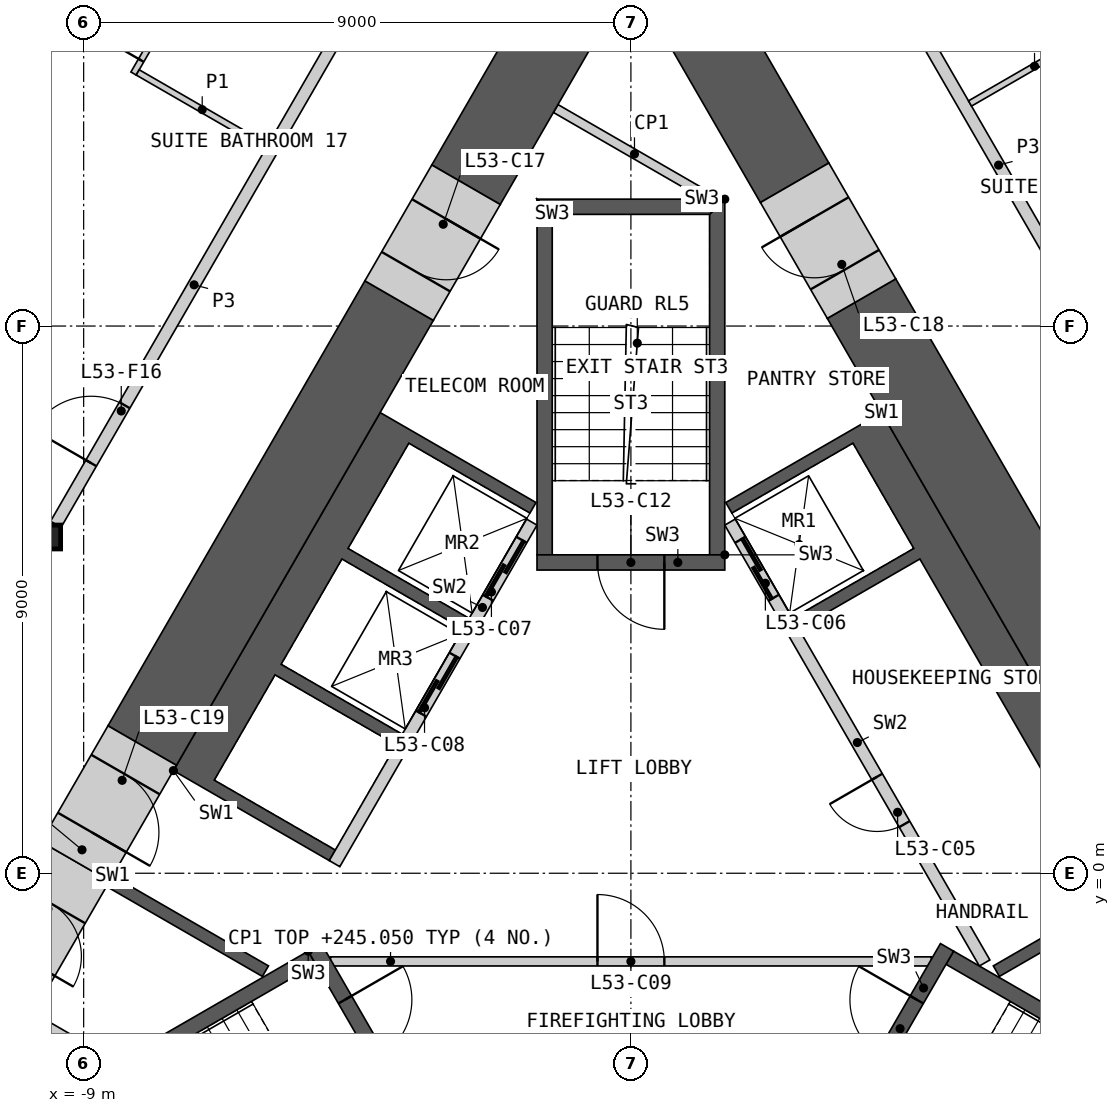
"""IFC4 building model, lengths in metres.
Left out: names, types, materials, properties, quantities, classifications, styles, units other than length and angle.
Written with IfcOpenShell. Run it as: python <this file> out.ifc"""

import sys

from ifc_helpers import new_model, si_unit, direction, frame, frame_2d, origin, origin_2d, place, context, subcontext, project, spatial, polyline, rectangle, i_section, outline, extrude, element, fill, save


model = new_model("IFC4")
c1 = context("Model", 3, precision=1e-05, world=origin(), true_north=direction((0.0, 1.0)))
c2 = subcontext(c1, "Body", "Model", "MODEL_VIEW")
j1 = project(units=[si_unit("LENGTHUNIT", "METRE"), si_unit("PLANEANGLEUNIT", "RADIAN")], contexts=[c1])
p1 = place(None, origin())
s1 = spatial("IfcSite", under=j1, at=p1, CompositionType="ELEMENT")
p2 = place(p1, origin())
s2 = spatial("IfcBuilding", under=s1, at=p2, CompositionType="ELEMENT")
p3 = place(p2, frame((0.0, 0.0, 241.8)))
s3 = spatial("IfcBuildingStorey", under=s2, at=p3, CompositionType="ELEMENT", Elevation=241.8)
p4 = place(p3, frame((-9.578, 5.53, 0.0), z_axis=(0.0, 0.0, 1.0), x_axis=(1.0, 0.0, 0.0)))
e1 = element("IfcColumn", 1, at=p4, inside=s3, PredefinedType="COLUMN", context=c2, shape_type="SweptSolid", body=[
    extrude(i_section(OverallWidth=0.399, OverallDepth=0.393, WebThickness=0.023, FlangeThickness=0.037, at=origin_2d()), origin(), (0.0, 0.0, 1.0), 3.6),
])
p5 = place(p3, origin())
e2 = element("IfcWall", 2, at=p5, inside=s3, PredefinedType="SHEAR", context=c2, shape_type="SweptSolid", body=[
    extrude(outline(polyline([(4.124, 7.577), (8.624, -0.217), (8.231, -0.444), (6.061, -1.697), (5.96, -1.524), (7.952, -0.374), (4.752, 5.169), (2.76, 4.019), (2.66, 4.192), (4.652, 5.342), (3.652, 7.074), (1.66, 5.924), (1.561, 6.097), (3.731, 7.35), (4.124, 7.577)])), origin(), (0.0, 0.0, 1.0), 3.25),
])
p6 = place(p3, frame((5.817, -1.476, 0.0), z_axis=(0.0, 0.0, 1.0), x_axis=(-0.500002616675, 0.866023893041, 0.0)))
e3 = element("IfcWall", 3, at=p6, inside=s3, PredefinedType="SOLIDWALL", context=c2, shape_type="SweptSolid", body=[
    extrude(rectangle(XDim=8.373, YDim=0.2, at=frame_2d((4.187, 0.0))), origin(), (0.0, 0.0, 1.0), 3.25),
])
p7 = place(p6, frame((2.637, 0.0, 0.0)))
e4 = element("IfcOpeningElement", 4, at=p7, cuts=e3, PredefinedType="OPENING", context=c2, shape_type="SweptSolid", body=[
    extrude(rectangle(XDim=0.9, YDim=2.1, at=frame_2d((0.45, 1.05))), frame((0.0, 0.11, 0.0), z_axis=(0.0, -1.0, 0.0), x_axis=(1.0, 0.0, 0.0)), (0.0, 0.0, 1.0), 0.22),
])
p8 = place(p6, frame((6.937, 0.0, 0.0)))
e5 = element("IfcOpeningElement", 5, at=p8, cuts=e3, PredefinedType="OPENING", context=c2, shape_type="SweptSolid", body=[
    extrude(rectangle(XDim=1.1, YDim=2.1, at=frame_2d((0.55, 1.05))), frame((0.0, 0.11, 0.0), z_axis=(0.0, -1.0, 0.0), x_axis=(1.0, 0.0, 0.0)), (0.0, 0.0, 1.0), 0.22),
])
p9 = place(p3, origin())
e6 = element("IfcWall", 6, at=p9, inside=s3, PredefinedType="SHEAR", context=c2, shape_type="SweptSolid", body=[
    extrude(outline(polyline([(-7.524, 1.688), (-4.124, 7.577), (-3.731, 7.35), (-1.561, 6.097), (-1.66, 5.924), (-3.652, 7.074), (-4.652, 5.342), (-2.66, 4.192), (-2.76, 4.019), (-4.752, 5.169), (-5.752, 3.437), (-3.76, 2.287), (-3.861, 2.113), (-5.852, 3.263), (-6.852, 1.531), (-4.861, 0.381), (-4.96, 0.208), (-7.131, 1.461), (-7.524, 1.688)])), origin(), (0.0, 0.0, 1.0), 3.25),
])
p10 = place(p3, origin())
e7 = element("IfcWall", 7, at=p10, inside=s3, PredefinedType="SHEAR", context=c2, shape_type="SweptSolid", body=[
    extrude(outline(polyline([(-8.524, -0.044), (-8.131, -0.271), (-5.96, -1.524), (-6.061, -1.697), (-8.231, -0.444), (-8.624, -0.217), (-8.524, -0.044)])), origin(), (0.0, 0.0, 1.0), 3.25),
])
p11 = place(p3, frame((-1.631, 5.776, 0.0), z_axis=(0.0, 0.0, 1.0), x_axis=(-0.499992876559, -0.866029516466, 0.0)))
e8 = element("IfcWall", 8, at=p11, inside=s3, PredefinedType="SOLIDWALL", context=c2, shape_type="SweptSolid", body=[
    extrude(rectangle(XDim=6.486, YDim=0.2, at=frame_2d((3.243, 0.0))), origin(), (0.0, 0.0, 1.0), 3.25),
])
p12 = place(p11, frame((0.337, 0.0, 0.0)))
e9 = element("IfcOpeningElement", 9, at=p12, cuts=e8, PredefinedType="OPENING", context=c2, shape_type="SweptSolid", body=[
    extrude(rectangle(XDim=1.1, YDim=2.1, at=frame_2d((0.55, 1.05))), frame((0.0, 0.11, 0.0), z_axis=(0.0, -1.0, 0.0), x_axis=(1.0, 0.0, 0.0)), (0.0, 0.0, 1.0), 0.22),
])
p13 = place(p11, frame((2.537, 0.0, 0.0)))
e10 = element("IfcOpeningElement", 10, at=p13, cuts=e8, PredefinedType="OPENING", context=c2, shape_type="SweptSolid", body=[
    extrude(rectangle(XDim=1.1, YDim=2.1, at=frame_2d((0.55, 1.05))), frame((0.0, 0.11, 0.0), z_axis=(0.0, -1.0, 0.0), x_axis=(1.0, 0.0, 0.0)), (0.0, 0.0, 1.0), 0.22),
])
p14 = place(p3, frame((-4.941, -1.45, 0.0), z_axis=(0.0, 0.0, 1.0), x_axis=(1.0, 0.0, 0.0)))
e11 = element("IfcWall", 11, at=p14, inside=s3, PredefinedType="PARTITIONING", context=c2, shape_type="SweptSolid", body=[
    extrude(rectangle(XDim=9.882, YDim=0.15, at=frame_2d((4.941, 0.0))), origin(), (0.0, 0.0, 1.0), 3.25),
])
p15 = place(p14, frame((4.391, 0.0, 0.0)))
e12 = element("IfcOpeningElement", 12, at=p15, cuts=e11, PredefinedType="OPENING", context=c2, shape_type="SweptSolid", body=[
    extrude(rectangle(XDim=1.1, YDim=2.1, at=frame_2d((0.55, 1.05))), frame((0.0, 0.085, 0.0), z_axis=(0.0, -1.0, 0.0), x_axis=(1.0, 0.0, 0.0)), (0.0, 0.0, 1.0), 0.17),
])
p16 = place(p3, origin())
e13 = element("IfcWall", 13, at=p16, inside=s3, PredefinedType="SHEAR", context=c2, shape_type="SweptSolid", body=[
    extrude(outline(polyline([(-5.307, -1.281), (-10.374, -4.206), (-10.032, -4.298), (-5.182, -1.498), (-5.307, -1.281)])), origin(), (0.0, 0.0, 1.0), 3.25),
])
p17 = place(p3, frame((-5.199, -1.219, 0.0), z_axis=(0.0, 0.0, 1.0), x_axis=(0.499982516597, -0.866035497597, 0.0)))
e14 = element("IfcWall", 14, at=p17, inside=s3, PredefinedType="SHEAR", context=c2, shape_type="SweptSolid", body=[
    extrude(rectangle(XDim=3.088, YDim=0.25, at=frame_2d((1.544, 0.0))), origin(), (0.0, 0.0, 1.0), 3.25),
])
p18 = place(p17, frame((0.994, 0.0, 0.0)))
e15 = element("IfcOpeningElement", 15, at=p18, cuts=e14, PredefinedType="OPENING", context=c2, shape_type="SweptSolid", body=[
    extrude(rectangle(XDim=1.1, YDim=2.1, at=frame_2d((0.55, 1.05))), frame((0.0, 0.135, 0.0), z_axis=(0.0, -1.0, 0.0), x_axis=(1.0, 0.0, 0.0)), (0.0, 0.0, 1.0), 0.27),
])
p19 = place(p3, origin())
e16 = element("IfcWall", 16, at=p19, inside=s3, PredefinedType="SHEAR", context=c2, shape_type="SweptSolid", body=[
    extrude(outline(polyline([(10.032, -4.298), (10.374, -4.206), (5.307, -1.281), (5.182, -1.498), (10.032, -4.298)])), origin(), (0.0, 0.0, 1.0), 3.25),
])
p20 = place(p3, frame((3.655, -3.893, 0.0), z_axis=(0.0, 0.0, 1.0), x_axis=(0.499982516597, 0.866035497597, 0.0)))
e17 = element("IfcWall", 17, at=p20, inside=s3, PredefinedType="SHEAR", context=c2, shape_type="SweptSolid", body=[
    extrude(rectangle(XDim=3.088, YDim=0.25, at=frame_2d((1.544, 0.0))), origin(), (0.0, 0.0, 1.0), 3.25),
])
p21 = place(p20, frame((0.994, 0.0, 0.0)))
e18 = element("IfcOpeningElement", 18, at=p21, cuts=e17, PredefinedType="OPENING", context=c2, shape_type="SweptSolid", body=[
    extrude(rectangle(XDim=1.1, YDim=2.1, at=frame_2d((0.55, 1.05))), frame((0.0, 0.135, 0.0), z_axis=(0.0, -1.0, 0.0), x_axis=(1.0, 0.0, 0.0)), (0.0, 0.0, 1.0), 0.27),
])
p22 = place(p3, origin())
e19 = element("IfcWall", 19, at=p22, inside=s3, PredefinedType="SHEAR", context=c2, shape_type="SweptSolid", body=[
    extrude(outline(polyline([(1.544, 5.237), (1.544, 11.087), (1.294, 10.837), (1.294, 5.237), (1.544, 5.237)])), origin(), (0.0, 0.0, 1.0), 3.25),
])
p23 = place(p3, origin())
e20 = element("IfcWall", 20, at=p23, inside=s3, PredefinedType="SHEAR", context=c2, shape_type="SweptSolid", body=[
    extrude(outline(polyline([(1.544, 11.087), (-1.544, 11.087), (-1.294, 10.837), (1.294, 10.837), (1.544, 11.087)])), origin(), (0.0, 0.0, 1.0), 3.25),
])
p24 = place(p3, origin())
e21 = element("IfcWall", 21, at=p24, inside=s3, PredefinedType="SHEAR", context=c2, shape_type="SweptSolid", body=[
    extrude(outline(polyline([(-1.294, 10.837), (-1.544, 11.087), (-1.544, 5.237), (-1.294, 5.237), (-1.294, 10.837)])), origin(), (0.0, 0.0, 1.0), 3.25),
])
p25 = place(p3, frame((1.544, 5.112, 0.0), z_axis=(0.0, 0.0, 1.0), x_axis=(-1.0, 0.0, 0.0)))
e22 = element("IfcWall", 22, at=p25, inside=s3, PredefinedType="SHEAR", context=c2, shape_type="SweptSolid", body=[
    extrude(rectangle(XDim=3.088, YDim=0.25, at=frame_2d((1.544, 0.0))), origin(), (0.0, 0.0, 1.0), 3.25),
])
p26 = place(p25, frame((0.994, 0.0, 0.0)))
e23 = element("IfcOpeningElement", 23, at=p26, cuts=e22, PredefinedType="OPENING", context=c2, shape_type="SweptSolid", body=[
    extrude(rectangle(XDim=1.1, YDim=2.1, at=frame_2d((0.55, 1.05))), frame((0.0, 0.135, 0.0), z_axis=(0.0, -1.0, 0.0), x_axis=(1.0, 0.0, 0.0)), (0.0, 0.0, 1.0), 0.27),
])
p27 = place(p3, frame((-1.237, 12.578, 0.0), z_axis=(0.0, 0.0, 1.0), x_axis=(0.866045649925, -0.499964931016, 0.0)))
e24 = element("IfcWall", 24, at=p27, inside=s3, PredefinedType="PARTITIONING", context=c2, shape_type="SweptSolid", body=[
    extrude(rectangle(XDim=2.992, YDim=0.15, at=frame_2d((1.496, 0.0))), origin(), (0.0, 0.0, 1.0), 3.25),
])
p28 = place(p3, frame((-9.862, -2.361, 0.0), z_axis=(0.0, 0.0, 1.0), x_axis=(0.865990094875, -0.500061151839, 0.0)))
e25 = element("IfcWall", 25, at=p28, inside=s3, PredefinedType="PARTITIONING", context=c2, shape_type="SweptSolid", body=[
    extrude(rectangle(XDim=1.56, YDim=0.15, at=frame_2d((0.78, 0.0))), origin(), (0.0, 0.0, 1.0), 3.25),
])
p29 = place(p3, frame((10.062, -1.408, 0.0), z_axis=(0.0, 0.0, 1.0), x_axis=(-0.500000545805, 0.866025088663, 0.0)))
e26 = element("IfcWall", 26, at=p29, inside=s3, PredefinedType="SHEAR", context=c2, shape_type="SweptSolid", body=[
    extrude(rectangle(XDim=12.539, YDim=1.3, at=frame_2d((6.27, 0.0))), origin(), (0.0, 0.0, 1.0), 3.25),
])
p30 = place(p3, frame((2.693, 11.356, 0.0), z_axis=(0.0, 0.0, 1.0), x_axis=(-0.50002837164, 0.866009022791, 0.0)))
e27 = element("IfcWall", 27, at=p30, inside=s3, PredefinedType="SHEAR", context=c2, shape_type="SweptSolid", body=[
    extrude(rectangle(XDim=4.26, YDim=1.3, at=frame_2d((2.13, 0.0))), origin(), (0.0, 0.0, 1.0), 3.25),
])
p31 = place(p3, frame((-3.812, 9.418, 0.0), z_axis=(0.0, 0.0, 1.0), x_axis=(-0.499995037753, -0.86602826872, 0.0)))
e28 = element("IfcWall", 28, at=p31, inside=s3, PredefinedType="SHEAR", context=c2, shape_type="SweptSolid", body=[
    extrude(rectangle(XDim=8.451, YDim=1.3, at=frame_2d((4.225, 0.0))), origin(), (0.0, 0.0, 1.0), 3.25),
])
p32 = place(p3, frame((-0.563, 15.045, 0.0), z_axis=(0.0, 0.0, 1.0), x_axis=(-0.499994567278, -0.866028540345, 0.0)))
e29 = element("IfcWall", 29, at=p32, inside=s3, PredefinedType="SHEAR", context=c2, shape_type="SweptSolid", body=[
    extrude(rectangle(XDim=4.297, YDim=1.3, at=frame_2d((2.149, 0.0))), origin(), (0.0, 0.0, 1.0), 3.25),
])
p33 = place(p3, frame((-9.137, 0.195, 0.0), z_axis=(0.0, 0.0, 1.0), x_axis=(-0.500009943768, -0.866019662671, 0.0)))
e30 = element("IfcWall", 30, at=p33, inside=s3, PredefinedType="SHEAR", context=c2, shape_type="SweptSolid", body=[
    extrude(rectangle(XDim=2.401, YDim=1.3, at=frame_2d((1.201, 0.0))), origin(), (0.0, 0.0, 1.0), 3.25),
])
p34 = place(p33, frame((0.8, 0.0, 0.0)))
e31 = element("IfcOpeningElement", 31, at=p34, cuts=e30, PredefinedType="OPENING", context=c2, shape_type="SweptSolid", body=[
    extrude(rectangle(XDim=1.0, YDim=2.1, at=frame_2d((0.5, 1.05))), frame((0.0, 0.66, 0.0), z_axis=(0.0, -1.0, 0.0), x_axis=(1.0, 0.0, 0.0)), (0.0, 0.0, 1.0), 1.32),
])
p35 = place(p3, frame((-2.712, 11.324, 0.0), z_axis=(0.0, 0.0, 1.0), x_axis=(-0.499946605688, -0.86605622881, 0.0)))
e32 = element("IfcWall", 32, at=p35, inside=s3, PredefinedType="SHEAR", context=c2, shape_type="SweptSolid", body=[
    extrude(rectangle(XDim=2.2, YDim=1.3, at=frame_2d((1.1, 0.0))), origin(), (0.0, 0.0, 1.0), 3.25),
])
p36 = place(p35, frame((0.65, 0.0, 0.0)))
e33 = element("IfcOpeningElement", 33, at=p36, cuts=e32, PredefinedType="OPENING", context=c2, shape_type="SweptSolid", body=[
    extrude(rectangle(XDim=1.0, YDim=2.1, at=frame_2d((0.5, 1.05))), frame((0.0, 0.66, 0.0), z_axis=(0.0, -1.0, 0.0), x_axis=(1.0, 0.0, 0.0)), (0.0, 0.0, 1.0), 1.32),
])
p37 = place(p3, frame((3.793, 9.451, 0.0), z_axis=(0.0, 0.0, 1.0), x_axis=(-0.499946605688, 0.86605622881, 0.0)))
e34 = element("IfcWall", 34, at=p37, inside=s3, PredefinedType="SHEAR", context=c2, shape_type="SweptSolid", body=[
    extrude(rectangle(XDim=2.2, YDim=1.3, at=frame_2d((1.1, 0.0))), origin(), (0.0, 0.0, 1.0), 3.25),
])
p38 = place(p37, frame((0.55, 0.0, 0.0)))
e35 = element("IfcOpeningElement", 35, at=p38, cuts=e34, PredefinedType="OPENING", context=c2, shape_type="SweptSolid", body=[
    extrude(rectangle(XDim=1.0, YDim=2.1, at=frame_2d((0.5, 1.05))), frame((0.0, 0.66, 0.0), z_axis=(0.0, -1.0, 0.0), x_axis=(1.0, 0.0, 0.0)), (0.0, 0.0, 1.0), 1.32),
])
p39 = place(p3, frame((-8.037, 2.1, 0.0), z_axis=(0.0, 0.0, 1.0), x_axis=(-0.50002983664, -0.866008176907, 0.0)))
e36 = element("IfcWall", 36, at=p39, inside=s3, PredefinedType="SHEAR", context=c2, shape_type="SweptSolid", body=[
    extrude(rectangle(XDim=2.2, YDim=1.3, at=frame_2d((1.1, 0.0))), origin(), (0.0, 0.0, 1.0), 3.25),
])
p40 = place(p39, frame((0.55, 0.0, 0.0)))
e37 = element("IfcOpeningElement", 37, at=p40, cuts=e36, PredefinedType="OPENING", context=c2, shape_type="SweptSolid", body=[
    extrude(rectangle(XDim=1.1, YDim=2.1, at=frame_2d((0.55, 1.05))), frame((0.0, 0.66, 0.0), z_axis=(0.0, -1.0, 0.0), x_axis=(1.0, 0.0, 0.0)), (0.0, 0.0, 1.0), 1.32),
])
p41 = place(p3, frame((4.91, 13.616, 0.0), z_axis=(0.0, 0.0, 1.0), x_axis=(0.50000207303, -0.866024206917, 0.0)))
e38 = element("IfcWall", 38, at=p41, inside=s3, PredefinedType="PARTITIONING", context=c2, shape_type="SweptSolid", body=[
    extrude(rectangle(XDim=9.095, YDim=0.2, at=frame_2d((4.547, 0.0))), origin(), (0.0, 0.0, 1.0), 3.25),
])
p42 = place(p41, frame((5.726, 0.0, 0.0)))
e39 = element("IfcOpeningElement", 39, at=p42, cuts=e38, PredefinedType="OPENING", context=c2, shape_type="SweptSolid", body=[
    extrude(rectangle(XDim=1.8, YDim=2.1, at=frame_2d((0.9, 1.05))), frame((0.0, 0.11, 0.0), z_axis=(0.0, -1.0, 0.0), x_axis=(1.0, 0.0, 0.0)), (0.0, 0.0, 1.0), 0.22),
])
p43 = place(p3, frame((-9.458, 5.74, 0.0), z_axis=(0.0, 0.0, 1.0), x_axis=(0.50000207303, 0.866024206917, 0.0)))
e40 = element("IfcWall", 40, at=p43, inside=s3, PredefinedType="PARTITIONING", context=c2, shape_type="SweptSolid", body=[
    extrude(rectangle(XDim=9.095, YDim=0.2, at=frame_2d((4.547, 0.0))), origin(), (0.0, 0.0, 1.0), 3.25),
])
p44 = place(p43, frame((1.162, 0.0, 0.0)))
e41 = element("IfcOpeningElement", 41, at=p44, cuts=e40, PredefinedType="OPENING", context=c2, shape_type="SweptSolid", body=[
    extrude(rectangle(XDim=1.1, YDim=2.1, at=frame_2d((0.55, 1.05))), frame((0.0, 0.11, 0.0), z_axis=(0.0, -1.0, 0.0), x_axis=(1.0, 0.0, 0.0)), (0.0, 0.0, 1.0), 0.22),
])
p45 = place(p3, frame((-8.179, 13.153, 0.0), z_axis=(0.0, 0.0, 1.0), x_axis=(0.499996545922, 0.866027397988, 0.0)))
e42 = element("IfcWall", 42, at=p45, inside=s3, PredefinedType="PARTITIONING", context=c2, shape_type="SweptSolid", body=[
    extrude(rectangle(XDim=5.5, YDim=0.1, at=frame_2d((2.75, 0.0))), origin(), (0.0, 0.0, 1.0), 2.404),
])
p46 = place(p45, frame((4.3, 0.0, 0.0)))
e43 = element("IfcOpeningElement", 43, at=p46, cuts=e42, PredefinedType="OPENING", context=c2, shape_type="SweptSolid", body=[
    extrude(rectangle(XDim=0.95, YDim=2.1, at=frame_2d((0.475, 1.05))), frame((0.0, 0.06, 0.0), z_axis=(0.0, -1.0, 0.0), x_axis=(1.0, 0.0, 0.0)), (0.0, 0.0, 1.0), 0.12),
])
p47 = place(p45, frame((0.25, 0.0, 0.0)))
e44 = element("IfcOpeningElement", 44, at=p47, cuts=e42, PredefinedType="OPENING", context=c2, shape_type="SweptSolid", body=[
    extrude(rectangle(XDim=0.95, YDim=2.1, at=frame_2d((0.475, 1.05))), frame((0.0, 0.06, 0.0), z_axis=(0.0, -1.0, 0.0), x_axis=(1.0, 0.0, 0.0)), (0.0, 0.0, 1.0), 0.12),
])
p48 = place(p3, frame((5.577, 12.66, 0.0), z_axis=(0.0, 0.0, 1.0), x_axis=(0.866014668023, 0.500018594424, 0.0)))
e45 = element("IfcWall", 45, at=p48, inside=s3, PredefinedType="PARTITIONING", context=c2, shape_type="SweptSolid", body=[
    extrude(rectangle(XDim=2.45, YDim=0.1, at=frame_2d((1.225, 0.0))), origin(), (0.0, 0.0, 1.0), 2.404),
])
p49 = place(p3, frame((-8.111, 13.172, 0.0), z_axis=(0.0, 0.0, 1.0), x_axis=(0.865989751695, -0.500061746146, 0.0)))
e46 = element("IfcWall", 46, at=p49, inside=s3, PredefinedType="PARTITIONING", context=c2, shape_type="SweptSolid", body=[
    extrude(rectangle(XDim=2.45, YDim=0.1, at=frame_2d((1.225, 0.0))), origin(), (0.0, 0.0, 1.0), 2.404),
])
p50 = place(p7, origin())
e47 = element("IfcDoor", 47, at=p50, inside=s3, OperationType="SINGLE_SWING_RIGHT", PredefinedType="DOOR", context=c2, shape_type="SweptSolid", body=[
    extrude(rectangle(XDim=0.9, YDim=2.1, at=frame_2d((0.45, 1.05))), frame((0.0, 0.025, 0.0), z_axis=(0.0, -1.0, 0.0), x_axis=(1.0, 0.0, 0.0)), (0.0, 0.0, 1.0), 0.05),
])
fill(e4, e47)
p51 = place(p8, origin())
e48 = element("IfcDoor", 48, at=p51, inside=s3, OperationType="SLIDING_TO_LEFT", PredefinedType="DOOR", context=c2, shape_type="SweptSolid", body=[
    extrude(rectangle(XDim=1.1, YDim=2.1, at=frame_2d((0.55, 1.05))), frame((0.0, 0.025, 0.0), z_axis=(0.0, -1.0, 0.0), x_axis=(1.0, 0.0, 0.0)), (0.0, 0.0, 1.0), 0.05),
])
fill(e5, e48)
p52 = place(p12, origin())
e49 = element("IfcDoor", 49, at=p52, inside=s3, OperationType="SLIDING_TO_LEFT", PredefinedType="DOOR", context=c2, shape_type="SweptSolid", body=[
    extrude(rectangle(XDim=1.1, YDim=2.1, at=frame_2d((0.55, 1.05))), frame((0.0, 0.025, 0.0), z_axis=(0.0, -1.0, 0.0), x_axis=(1.0, 0.0, 0.0)), (0.0, 0.0, 1.0), 0.05),
])
fill(e9, e49)
p53 = place(p13, origin())
e50 = element("IfcDoor", 50, at=p53, inside=s3, OperationType="SLIDING_TO_LEFT", PredefinedType="DOOR", context=c2, shape_type="SweptSolid", body=[
    extrude(rectangle(XDim=1.1, YDim=2.1, at=frame_2d((0.55, 1.05))), frame((0.0, 0.025, 0.0), z_axis=(0.0, -1.0, 0.0), x_axis=(1.0, 0.0, 0.0)), (0.0, 0.0, 1.0), 0.05),
])
fill(e10, e50)
p54 = place(p15, origin())
e51 = element("IfcDoor", 51, at=p54, inside=s3, OperationType="SINGLE_SWING_LEFT", PredefinedType="DOOR", context=c2, shape_type="SweptSolid", body=[
    extrude(rectangle(XDim=1.1, YDim=2.1, at=frame_2d((0.55, 1.05))), frame((0.0, 0.025, 0.0), z_axis=(0.0, -1.0, 0.0), x_axis=(1.0, 0.0, 0.0)), (0.0, 0.0, 1.0), 0.05),
])
fill(e12, e51)
p55 = place(p18, origin())
e52 = element("IfcDoor", 52, at=p55, inside=s3, OperationType="SINGLE_SWING_LEFT", PredefinedType="DOOR", context=c2, shape_type="SweptSolid", body=[
    extrude(rectangle(XDim=1.1, YDim=2.1, at=frame_2d((0.55, 1.05))), frame((0.0, 0.025, 0.0), z_axis=(0.0, -1.0, 0.0), x_axis=(1.0, 0.0, 0.0)), (0.0, 0.0, 1.0), 0.05),
])
fill(e15, e52)
p56 = place(p21, origin())
e53 = element("IfcDoor", 53, at=p56, inside=s3, OperationType="SINGLE_SWING_RIGHT", PredefinedType="DOOR", context=c2, shape_type="SweptSolid", body=[
    extrude(rectangle(XDim=1.1, YDim=2.1, at=frame_2d((0.55, 1.05))), frame((0.0, 0.025, 0.0), z_axis=(0.0, -1.0, 0.0), x_axis=(1.0, 0.0, 0.0)), (0.0, 0.0, 1.0), 0.05),
])
fill(e18, e53)
p57 = place(p26, origin())
e54 = element("IfcDoor", 54, at=p57, inside=s3, OperationType="SINGLE_SWING_LEFT", PredefinedType="DOOR", context=c2, shape_type="SweptSolid", body=[
    extrude(rectangle(XDim=1.1, YDim=2.1, at=frame_2d((0.55, 1.05))), frame((0.0, 0.025, 0.0), z_axis=(0.0, -1.0, 0.0), x_axis=(1.0, 0.0, 0.0)), (0.0, 0.0, 1.0), 0.05),
])
fill(e23, e54)
p58 = place(p34, origin())
e55 = element("IfcDoor", 55, at=p58, inside=s3, OperationType="SINGLE_SWING_RIGHT", PredefinedType="DOOR", context=c2, shape_type="SweptSolid", body=[
    extrude(rectangle(XDim=1.0, YDim=2.1, at=frame_2d((0.5, 1.05))), frame((0.0, 0.405, 0.0), z_axis=(0.0, -1.0, 0.0), x_axis=(1.0, 0.0, 0.0)), (0.0, 0.0, 1.0), 0.05),
])
fill(e31, e55)
p59 = place(p36, origin())
e56 = element("IfcDoor", 56, at=p59, inside=s3, OperationType="SINGLE_SWING_LEFT", PredefinedType="DOOR", context=c2, shape_type="SweptSolid", body=[
    extrude(rectangle(XDim=1.0, YDim=2.1, at=frame_2d((0.5, 1.05))), frame((0.0, 0.405, 0.0), z_axis=(0.0, -1.0, 0.0), x_axis=(1.0, 0.0, 0.0)), (0.0, 0.0, 1.0), 0.05),
])
fill(e33, e56)
p60 = place(p38, origin())
e57 = element("IfcDoor", 57, at=p60, inside=s3, OperationType="SINGLE_SWING_RIGHT", PredefinedType="DOOR", context=c2, shape_type="SweptSolid", body=[
    extrude(rectangle(XDim=1.0, YDim=2.1, at=frame_2d((0.5, 1.05))), frame((0.0, 0.405, 0.0), z_axis=(0.0, -1.0, 0.0), x_axis=(1.0, 0.0, 0.0)), (0.0, 0.0, 1.0), 0.05),
])
fill(e35, e57)
p61 = place(p40, origin())
e58 = element("IfcDoor", 58, at=p61, inside=s3, OperationType="SINGLE_SWING_RIGHT", PredefinedType="DOOR", context=c2, shape_type="SweptSolid", body=[
    extrude(rectangle(XDim=1.1, YDim=2.1, at=frame_2d((0.55, 1.05))), frame((0.0, 0.405, 0.0), z_axis=(0.0, -1.0, 0.0), x_axis=(1.0, 0.0, 0.0)), (0.0, 0.0, 1.0), 0.05),
])
fill(e37, e58)
p62 = place(p44, origin())
e59 = element("IfcDoor", 59, at=p62, inside=s3, OperationType="SINGLE_SWING_LEFT", PredefinedType="DOOR", context=c2, shape_type="SweptSolid", body=[
    extrude(rectangle(XDim=1.1, YDim=2.1, at=frame_2d((0.55, 1.05))), frame((0.0, 0.025, 0.0), z_axis=(0.0, -1.0, 0.0), x_axis=(1.0, 0.0, 0.0)), (0.0, 0.0, 1.0), 0.05),
])
fill(e41, e59)
p63 = place(p47, origin())
e60 = element("IfcDoor", 60, at=p63, inside=s3, OperationType="SINGLE_SWING_LEFT", PredefinedType="DOOR", context=c2, shape_type="SweptSolid", body=[
    extrude(rectangle(XDim=0.95, YDim=2.1, at=frame_2d((0.475, 1.05))), frame((0.0, 0.025, 0.0), z_axis=(0.0, -1.0, 0.0), x_axis=(1.0, 0.0, 0.0)), (0.0, 0.0, 1.0), 0.05),
])
fill(e44, e60)
save(model, sys.argv[1])
